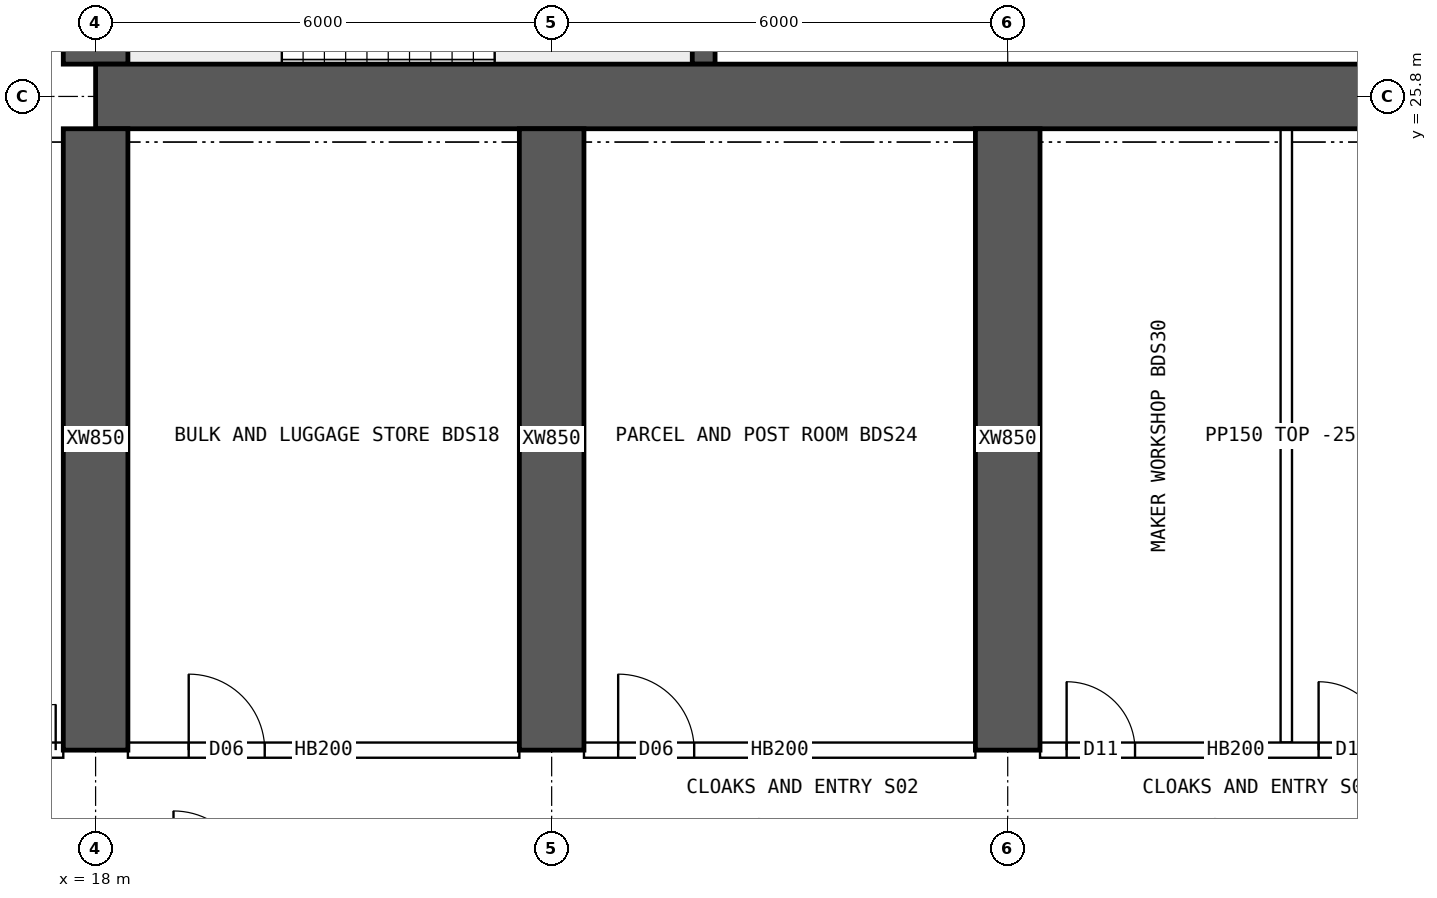
"""IFC4 building model, lengths in metres.
Left out: names, types, materials, properties, quantities, classifications, styles, units other than length and angle.
Written with IfcOpenShell. Run it as: python <this file> out.ifc"""

import sys

from ifc_helpers import new_model, si_unit, direction, frame, frame_2d, origin, place, context, subcontext, project, spatial, rectangle, extrude, element, fill, save


model = new_model("IFC4")
c1 = context("Model", 3, precision=1e-05, world=origin(), true_north=direction((0.0, 1.0)))
c2 = subcontext(c1, "Body", "Model", "MODEL_VIEW")
j1 = project(units=[si_unit("LENGTHUNIT", "METRE"), si_unit("PLANEANGLEUNIT", "RADIAN")], contexts=[c1])
p1 = place(None, origin())
s1 = spatial("IfcSite", under=j1, at=p1, CompositionType="ELEMENT")
p2 = place(p1, origin())
s2 = spatial("IfcBuilding", under=s1, at=p2, CompositionType="ELEMENT")
p3 = place(p2, frame((0.0, 0.0, 178.6)))
s3 = spatial("IfcBuildingStorey", under=s2, at=p3, CompositionType="ELEMENT", Elevation=178.6)
p4 = place(p3, frame((18.0, 25.8, 0.0), z_axis=(0.0, 0.0, 1.0), x_axis=(1.0, 0.0, 0.0)))
e1 = element("IfcWall", 1, at=p4, inside=s3, PredefinedType="SHEAR", context=c2, shape_type="SweptSolid", body=[
    extrude(rectangle(XDim=48.0, YDim=0.85, at=frame_2d((24.0, 0.0))), origin(), (0.0, 0.0, 1.0), 3.75),
])
p5 = place(p3, frame((18.0, 26.225, 0.0), z_axis=(0.0, 0.0, 1.0), x_axis=(0.0, 1.0, 0.0)))
e2 = element("IfcWall", 2, at=p5, inside=s3, PredefinedType="SHEAR", context=c2, shape_type="SweptSolid", body=[
    extrude(rectangle(XDim=11.55, YDim=0.85, at=frame_2d((5.775, 0.0))), origin(), (0.0, 0.0, 1.0), 3.75),
])
p6 = place(p5, frame((5.075, 0.0, 0.0)))
e3 = element("IfcOpeningElement", 3, at=p6, cuts=e2, PredefinedType="OPENING", context=c2, shape_type="SweptSolid", body=[
    extrude(rectangle(XDim=1.2, YDim=2.1, at=frame_2d((0.6, 1.05))), frame((0.0, 0.435, 0.0), z_axis=(0.0, -1.0, 0.0), x_axis=(1.0, 0.0, 0.0)), (0.0, 0.0, 1.0), 0.87),
])
p7 = place(p3, frame((26.0, 26.225, 0.0), z_axis=(0.0, 0.0, 1.0), x_axis=(0.0, 1.0, 0.0)))
e4 = element("IfcWall", 4, at=p7, inside=s3, PredefinedType="SHEAR", context=c2, shape_type="SweptSolid", body=[
    extrude(rectangle(XDim=4.025, YDim=0.3, at=frame_2d((2.012, 0.0))), origin(), (0.0, 0.0, 1.0), 3.75),
])
for number, where, z_axis, x_axis in (
    (5, (18.0, 17.2, 0.0), (0.0, 0.0, 1.0), (0.0, 1.0, 0.0)),
    (6, (24.0, 17.2, 0.0), (0.0, 0.0, 1.0), (0.0, 1.0, 0.0)),
    (7, (30.0, 17.2, 0.0), (0.0, 0.0, 1.0), (0.0, 1.0, 0.0)),
):
    element("IfcWall", number, at=place(p3, frame(where, z_axis=z_axis, x_axis=x_axis)), inside=s3, PredefinedType="SHEAR", context=c2, shape_type="SweptSolid", body=[
        extrude(rectangle(XDim=8.175, YDim=0.85, at=frame_2d((4.087, 0.0))), origin(), (0.0, 0.0, 1.0), 3.75),
    ])
p8 = place(p3, frame((15.6, 17.2, 0.0), z_axis=(0.0, 0.0, 1.0), x_axis=(1.0, 0.0, 0.0)))
e8 = element("IfcWall", 8, at=p8, inside=s3, PredefinedType="SOLIDWALL", context=c2, shape_type="SweptSolid", body=[
    extrude(rectangle(XDim=1.975, YDim=0.2, at=frame_2d((0.987, 0.0))), origin(), (0.0, 0.0, 1.0), 3.5),
])
p9 = place(p8, frame((0.675, 0.0, 0.0)))
e9 = element("IfcOpeningElement", 9, at=p9, cuts=e8, PredefinedType="OPENING", context=c2, shape_type="SweptSolid", body=[
    extrude(rectangle(XDim=1.2, YDim=2.1, at=frame_2d((0.6, 1.05))), frame((0.0, 0.11, 0.0), z_axis=(0.0, -1.0, 0.0), x_axis=(1.0, 0.0, 0.0)), (0.0, 0.0, 1.0), 0.22),
])
p10 = place(p3, frame((18.425, 17.2, 0.0), z_axis=(0.0, 0.0, 1.0), x_axis=(1.0, 0.0, 0.0)))
e10 = element("IfcWall", 10, at=p10, inside=s3, PredefinedType="SOLIDWALL", context=c2, shape_type="SweptSolid", body=[
    extrude(rectangle(XDim=5.15, YDim=0.2, at=frame_2d((2.575, 0.0))), origin(), (0.0, 0.0, 1.0), 3.5),
])
p11 = place(p10, frame((0.8, 0.0, 0.0)))
e11 = element("IfcOpeningElement", 11, at=p11, cuts=e10, PredefinedType="OPENING", context=c2, shape_type="SweptSolid", body=[
    extrude(rectangle(XDim=1.0, YDim=2.1, at=frame_2d((0.5, 1.05))), frame((0.0, 0.11, 0.0), z_axis=(0.0, -1.0, 0.0), x_axis=(1.0, 0.0, 0.0)), (0.0, 0.0, 1.0), 0.22),
])
p12 = place(p3, frame((24.425, 17.2, 0.0), z_axis=(0.0, 0.0, 1.0), x_axis=(1.0, 0.0, 0.0)))
e12 = element("IfcWall", 12, at=p12, inside=s3, PredefinedType="SOLIDWALL", context=c2, shape_type="SweptSolid", body=[
    extrude(rectangle(XDim=5.15, YDim=0.2, at=frame_2d((2.575, 0.0))), origin(), (0.0, 0.0, 1.0), 3.5),
])
p13 = place(p12, frame((0.45, 0.0, 0.0)))
e13 = element("IfcOpeningElement", 13, at=p13, cuts=e12, PredefinedType="OPENING", context=c2, shape_type="SweptSolid", body=[
    extrude(rectangle(XDim=1.0, YDim=2.1, at=frame_2d((0.5, 1.05))), frame((0.0, 0.11, 0.0), z_axis=(0.0, -1.0, 0.0), x_axis=(1.0, 0.0, 0.0)), (0.0, 0.0, 1.0), 0.22),
])
p14 = place(p3, frame((30.425, 17.2, 0.0), z_axis=(0.0, 0.0, 1.0), x_axis=(1.0, 0.0, 0.0)))
e14 = element("IfcWall", 14, at=p14, inside=s3, PredefinedType="SOLIDWALL", context=c2, shape_type="SweptSolid", body=[
    extrude(rectangle(XDim=5.15, YDim=0.2, at=frame_2d((2.575, 0.0))), origin(), (0.0, 0.0, 1.0), 3.5),
])
p15 = place(p14, frame((0.35, 0.0, 0.0)))
e15 = element("IfcOpeningElement", 15, at=p15, cuts=e14, PredefinedType="OPENING", context=c2, shape_type="SweptSolid", body=[
    extrude(rectangle(XDim=0.9, YDim=2.1, at=frame_2d((0.45, 1.05))), frame((0.0, 0.11, 0.0), z_axis=(0.0, -1.0, 0.0), x_axis=(1.0, 0.0, 0.0)), (0.0, 0.0, 1.0), 0.22),
])
p16 = place(p14, frame((3.665, 0.0, 0.0)))
e16 = element("IfcOpeningElement", 16, at=p16, cuts=e14, PredefinedType="OPENING", context=c2, shape_type="SweptSolid", body=[
    extrude(rectangle(XDim=0.9, YDim=2.1, at=frame_2d((0.45, 1.05))), frame((0.0, 0.11, 0.0), z_axis=(0.0, -1.0, 0.0), x_axis=(1.0, 0.0, 0.0)), (0.0, 0.0, 1.0), 0.22),
])
p17 = place(p3, frame((33.665, 17.3, 0.0), z_axis=(0.0, 0.0, 1.0), x_axis=(0.0, 1.0, 0.0)))
e17 = element("IfcWall", 17, at=p17, inside=s3, PredefinedType="PARTITIONING", context=c2, shape_type="SweptSolid", body=[
    extrude(rectangle(XDim=8.075, YDim=0.15, at=frame_2d((4.038, 0.0))), origin(), (0.0, 0.0, 1.0), 3.5),
])
p18 = place(p9, origin())
e18 = element("IfcDoor", 18, at=p18, inside=s3, OperationType="DOUBLE_DOOR_SINGLE_SWING", PredefinedType="DOOR", context=c2, shape_type="SweptSolid", body=[
    extrude(rectangle(XDim=1.2, YDim=2.1, at=frame_2d((0.6, 1.05))), frame((0.0, 0.025, 0.0), z_axis=(0.0, -1.0, 0.0), x_axis=(1.0, 0.0, 0.0)), (0.0, 0.0, 1.0), 0.05),
])
fill(e9, e18)
p19 = place(p11, origin())
e19 = element("IfcDoor", 19, at=p19, inside=s3, OperationType="SINGLE_SWING_LEFT", PredefinedType="DOOR", context=c2, shape_type="SweptSolid", body=[
    extrude(rectangle(XDim=1.0, YDim=2.1, at=frame_2d((0.5, 1.05))), frame((0.0, 0.025, 0.0), z_axis=(0.0, -1.0, 0.0), x_axis=(1.0, 0.0, 0.0)), (0.0, 0.0, 1.0), 0.05),
])
fill(e11, e19)
p20 = place(p13, origin())
e20 = element("IfcDoor", 20, at=p20, inside=s3, OperationType="SINGLE_SWING_LEFT", PredefinedType="DOOR", context=c2, shape_type="SweptSolid", body=[
    extrude(rectangle(XDim=1.0, YDim=2.1, at=frame_2d((0.5, 1.05))), frame((0.0, 0.025, 0.0), z_axis=(0.0, -1.0, 0.0), x_axis=(1.0, 0.0, 0.0)), (0.0, 0.0, 1.0), 0.05),
])
fill(e13, e20)
p21 = place(p15, origin())
e21 = element("IfcDoor", 21, at=p21, inside=s3, OperationType="SINGLE_SWING_LEFT", PredefinedType="DOOR", context=c2, shape_type="SweptSolid", body=[
    extrude(rectangle(XDim=0.9, YDim=2.1, at=frame_2d((0.45, 1.05))), frame((0.0, 0.025, 0.0), z_axis=(0.0, -1.0, 0.0), x_axis=(1.0, 0.0, 0.0)), (0.0, 0.0, 1.0), 0.05),
])
fill(e15, e21)
p22 = place(p16, origin())
e22 = element("IfcDoor", 22, at=p22, inside=s3, OperationType="SINGLE_SWING_LEFT", PredefinedType="DOOR", context=c2, shape_type="SweptSolid", body=[
    extrude(rectangle(XDim=0.9, YDim=2.1, at=frame_2d((0.45, 1.05))), frame((0.0, 0.025, 0.0), z_axis=(0.0, -1.0, 0.0), x_axis=(1.0, 0.0, 0.0)), (0.0, 0.0, 1.0), 0.05),
])
fill(e16, e22)
save(model, sys.argv[1])
